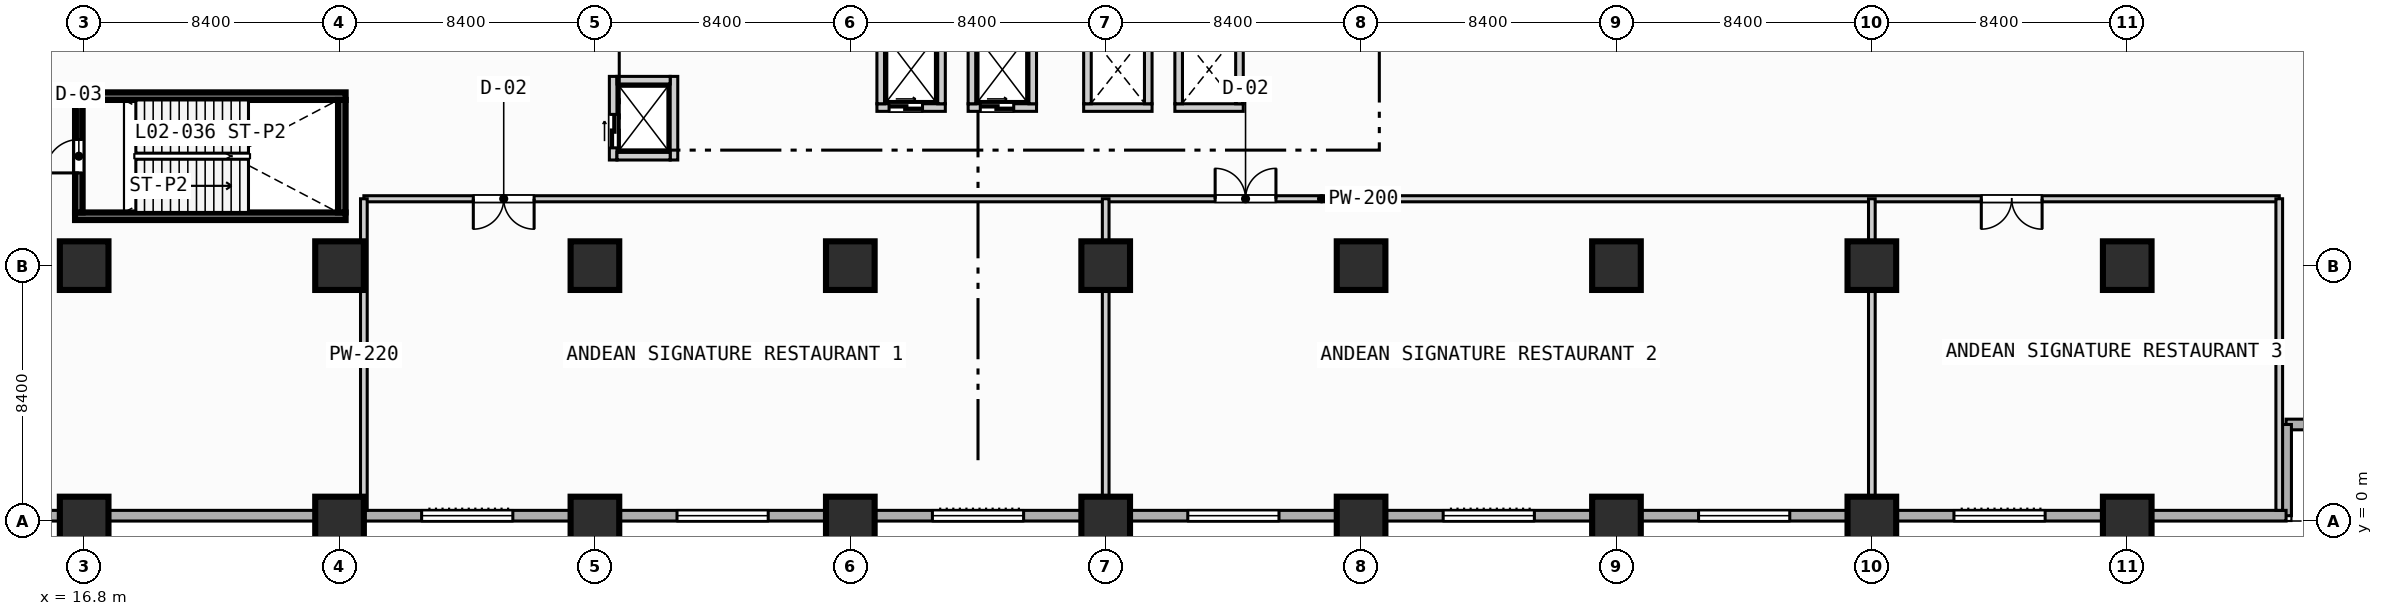
"""IFC4 building model, lengths in metres.
Left out: names, types, materials, properties, quantities, classifications, styles, units other than length and angle.
Written with IfcOpenShell. Run it as: python <this file> out.ifc"""

import sys

from ifc_helpers import new_model, si_unit, direction, frame, frame_2d, origin, origin_2d, place, context, subcontext, project, spatial, rectangle, extrude, element, fill, save


model = new_model("IFC4")
c1 = context("Model", 3, precision=1e-05, world=origin(), true_north=direction((0.0, 1.0)))
c2 = subcontext(c1, "Body", "Model", "MODEL_VIEW")
j1 = project(units=[si_unit("LENGTHUNIT", "METRE"), si_unit("PLANEANGLEUNIT", "RADIAN")], contexts=[c1])
p1 = place(None, origin())
s1 = spatial("IfcSite", under=j1, at=p1, CompositionType="ELEMENT")
p2 = place(p1, origin())
s2 = spatial("IfcBuilding", under=s1, at=p2, CompositionType="ELEMENT")
p3 = place(p2, frame((0.0, 0.0, 10.8)))
s3 = spatial("IfcBuildingStorey", under=s2, at=p3, CompositionType="ELEMENT", Elevation=10.8)
for number, where, z_axis, x_axis in (
    (1, (16.5, 10.025, 0.0), (0.0, 0.0, 1.0), (1.0, 0.0, 0.0)),
    (2, (16.5, 13.975, 0.0), (0.0, 0.0, 1.0), (1.0, 0.0, 0.0)),
):
    element("IfcWall", number, at=place(p3, frame(where, z_axis=z_axis, x_axis=x_axis)), inside=s3, PredefinedType="SOLIDWALL", context=c2, shape_type="SweptSolid", body=[
        extrude(rectangle(XDim=8.9, YDim=0.25, at=frame_2d((4.45, 0.0))), origin(), (0.0, 0.0, 1.0), 4.45),
    ])
p4 = place(p3, frame((25.275, 10.15, 0.0), z_axis=(0.0, 0.0, 1.0), x_axis=(0.0, 1.0, 0.0)))
e3 = element("IfcWall", 3, at=p4, inside=s3, PredefinedType="SOLIDWALL", context=c2, shape_type="SweptSolid", body=[
    extrude(rectangle(XDim=3.7, YDim=0.25, at=frame_2d((1.85, 0.0))), origin(), (0.0, 0.0, 1.0), 4.45),
])
for number, where, z_axis, x_axis in (
    (4, (16.8, 0.0, 0.0), (0.0, 0.0, 1.0), (1.0, 0.0, 0.0)),
    (5, (16.8, 8.4, 0.0), (0.0, 0.0, 1.0), (1.0, 0.0, 0.0)),
    (6, (25.2, 0.0, 0.0), (0.0, 0.0, 1.0), (1.0, 0.0, 0.0)),
    (7, (25.2, 8.4, 0.0), (0.0, 0.0, 1.0), (1.0, 0.0, 0.0)),
    (8, (33.6, 0.0, 0.0), (0.0, 0.0, 1.0), (1.0, 0.0, 0.0)),
    (9, (33.6, 8.4, 0.0), (0.0, 0.0, 1.0), (1.0, 0.0, 0.0)),
    (10, (42.0, 0.0, 0.0), (0.0, 0.0, 1.0), (1.0, 0.0, 0.0)),
    (11, (42.0, 8.4, 0.0), (0.0, 0.0, 1.0), (1.0, 0.0, 0.0)),
    (12, (50.4, 0.0, 0.0), (0.0, 0.0, 1.0), (1.0, 0.0, 0.0)),
    (13, (50.4, 8.4, 0.0), (0.0, 0.0, 1.0), (1.0, 0.0, 0.0)),
    (14, (58.8, 0.0, 0.0), (0.0, 0.0, 1.0), (1.0, 0.0, 0.0)),
    (15, (58.8, 8.4, 0.0), (0.0, 0.0, 1.0), (1.0, 0.0, 0.0)),
    (16, (67.2, 0.0, 0.0), (0.0, 0.0, 1.0), (1.0, 0.0, 0.0)),
    (17, (67.2, 8.4, 0.0), (0.0, 0.0, 1.0), (1.0, 0.0, 0.0)),
    (18, (75.6, 0.0, 0.0), (0.0, 0.0, 1.0), (1.0, 0.0, 0.0)),
    (19, (75.6, 8.4, 0.0), (0.0, 0.0, 1.0), (1.0, 0.0, 0.0)),
    (20, (84.0, 0.0, 0.0), (0.0, 0.0, 1.0), (1.0, 0.0, 0.0)),
    (21, (84.0, 8.4, 0.0), (0.0, 0.0, 1.0), (1.0, 0.0, 0.0)),
):
    element("IfcColumn", number, at=place(p3, frame(where, z_axis=z_axis, x_axis=x_axis)), inside=s3, PredefinedType="COLUMN", context=c2, shape_type="SweptSolid", body=[
        extrude(rectangle(XDim=1.6, YDim=1.6, at=origin_2d()), origin(), (0.0, 0.0, 1.0), 4.8),
    ])
for number, where, z_axis, x_axis in (
    (22, (92.225, 3.175, 0.0), (0.0, 0.0, 1.0), (-1.0, 0.0, 0.0)),
    (23, (89.225, 3.175, 0.0), (0.0, 0.0, 1.0), (0.0, -1.0, 0.0)),
):
    element("IfcWall", number, at=place(p3, frame(where, z_axis=z_axis, x_axis=x_axis)), inside=s3, PredefinedType="STANDARD", context=c2, shape_type="SweptSolid", body=[
        extrude(rectangle(XDim=3.0, YDim=0.35, at=frame_2d((1.5, 0.0))), origin(), (0.0, 0.0, 1.0), 4.45),
    ])
p5 = place(p3, frame((89.225, 0.175, 0.0), z_axis=(0.0, 0.0, 1.0), x_axis=(-1.0, 0.0, 0.0)))
e24 = element("IfcWall", 24, at=p5, inside=s3, PredefinedType="STANDARD", context=c2, shape_type="SweptSolid", body=[
    extrude(rectangle(XDim=86.05, YDim=0.35, at=frame_2d((43.025, 0.0))), origin(), (0.0, 0.0, 1.0), 4.45),
])
p6 = place(p5, frame((58.325, 0.0, 0.85)))
e25 = element("IfcOpeningElement", 25, at=p6, cuts=e24, PredefinedType="OPENING", context=c2, shape_type="SweptSolid", body=[
    extrude(rectangle(XDim=3.0, YDim=2.4, at=frame_2d((1.5, 1.2))), frame((0.0, 0.185, 0.0), z_axis=(0.0, -1.0, 0.0), x_axis=(1.0, 0.0, 0.0)), (0.0, 0.0, 1.0), 0.37),
])
p7 = place(p5, frame((49.925, 0.0, 0.85)))
e26 = element("IfcOpeningElement", 26, at=p7, cuts=e24, PredefinedType="OPENING", context=c2, shape_type="SweptSolid", body=[
    extrude(rectangle(XDim=3.0, YDim=2.4, at=frame_2d((1.5, 1.2))), frame((0.0, 0.185, 0.0), z_axis=(0.0, -1.0, 0.0), x_axis=(1.0, 0.0, 0.0)), (0.0, 0.0, 1.0), 0.37),
])
p8 = place(p5, frame((41.525, 0.0, 0.85)))
e27 = element("IfcOpeningElement", 27, at=p8, cuts=e24, PredefinedType="OPENING", context=c2, shape_type="SweptSolid", body=[
    extrude(rectangle(XDim=3.0, YDim=2.4, at=frame_2d((1.5, 1.2))), frame((0.0, 0.185, 0.0), z_axis=(0.0, -1.0, 0.0), x_axis=(1.0, 0.0, 0.0)), (0.0, 0.0, 1.0), 0.37),
])
p9 = place(p5, frame((33.125, 0.0, 0.85)))
e28 = element("IfcOpeningElement", 28, at=p9, cuts=e24, PredefinedType="OPENING", context=c2, shape_type="SweptSolid", body=[
    extrude(rectangle(XDim=3.0, YDim=2.4, at=frame_2d((1.5, 1.2))), frame((0.0, 0.185, 0.0), z_axis=(0.0, -1.0, 0.0), x_axis=(1.0, 0.0, 0.0)), (0.0, 0.0, 1.0), 0.37),
])
p10 = place(p5, frame((24.725, 0.0, 0.85)))
e29 = element("IfcOpeningElement", 29, at=p10, cuts=e24, PredefinedType="OPENING", context=c2, shape_type="SweptSolid", body=[
    extrude(rectangle(XDim=3.0, YDim=2.4, at=frame_2d((1.5, 1.2))), frame((0.0, 0.185, 0.0), z_axis=(0.0, -1.0, 0.0), x_axis=(1.0, 0.0, 0.0)), (0.0, 0.0, 1.0), 0.37),
])
p11 = place(p5, frame((16.325, 0.0, 0.85)))
e30 = element("IfcOpeningElement", 30, at=p11, cuts=e24, PredefinedType="OPENING", context=c2, shape_type="SweptSolid", body=[
    extrude(rectangle(XDim=3.0, YDim=2.4, at=frame_2d((1.5, 1.2))), frame((0.0, 0.185, 0.0), z_axis=(0.0, -1.0, 0.0), x_axis=(1.0, 0.0, 0.0)), (0.0, 0.0, 1.0), 0.37),
])
p12 = place(p5, frame((7.925, 0.0, 0.85)))
e31 = element("IfcOpeningElement", 31, at=p12, cuts=e24, PredefinedType="OPENING", context=c2, shape_type="SweptSolid", body=[
    extrude(rectangle(XDim=3.0, YDim=2.4, at=frame_2d((1.5, 1.2))), frame((0.0, 0.185, 0.0), z_axis=(0.0, -1.0, 0.0), x_axis=(1.0, 0.0, 0.0)), (0.0, 0.0, 1.0), 0.37),
])
p13 = place(p3, frame((34.2, 11.875, 0.0), z_axis=(0.0, 0.0, 1.0), x_axis=(0.0, 1.0, 0.0)))
e32 = element("IfcWall", 32, at=p13, inside=s3, PredefinedType="SOLIDWALL", context=c2, shape_type="SweptSolid", body=[
    extrude(rectangle(XDim=2.75, YDim=0.25, at=frame_2d((1.375, 0.0))), origin(), (0.0, 0.0, 1.0), 4.45),
])
p14 = place(p13, frame((0.4, 0.0, 0.0)))
e33 = element("IfcOpeningElement", 33, at=p14, cuts=e32, PredefinedType="OPENING", context=c2, shape_type="SweptSolid", body=[
    extrude(rectangle(XDim=1.1, YDim=2.15, at=frame_2d((0.55, 1.075))), frame((0.0, 0.135, 0.0), z_axis=(0.0, -1.0, 0.0), x_axis=(1.0, 0.0, 0.0)), (0.0, 0.0, 1.0), 0.27),
])
p15 = place(p3, frame((36.2, 11.875, 0.0), z_axis=(0.0, 0.0, 1.0), x_axis=(0.0, 1.0, 0.0)))
e34 = element("IfcWall", 34, at=p15, inside=s3, PredefinedType="SOLIDWALL", context=c2, shape_type="SweptSolid", body=[
    extrude(rectangle(XDim=2.75, YDim=0.25, at=frame_2d((1.375, 0.0))), origin(), (0.0, 0.0, 1.0), 4.45),
])
for number, where, z_axis, x_axis in (
    (35, (34.325, 12.0, 0.0), (0.0, 0.0, 1.0), (1.0, 0.0, 0.0)),
    (36, (34.325, 14.5, 0.0), (0.0, 0.0, 1.0), (1.0, 0.0, 0.0)),
):
    element("IfcWall", number, at=place(p3, frame(where, z_axis=z_axis, x_axis=x_axis)), inside=s3, PredefinedType="SOLIDWALL", context=c2, shape_type="SweptSolid", body=[
        extrude(rectangle(XDim=1.75, YDim=0.25, at=frame_2d((0.875, 0.0))), origin(), (0.0, 0.0, 1.0), 4.45),
    ])
p16 = place(p3, frame((42.875, 13.6, 0.0), z_axis=(0.0, 0.0, 1.0), x_axis=(1.0, 0.0, 0.0)))
e37 = element("IfcWall", 37, at=p16, inside=s3, PredefinedType="SOLIDWALL", context=c2, shape_type="SweptSolid", body=[
    extrude(rectangle(XDim=2.25, YDim=0.25, at=frame_2d((1.125, 0.0))), origin(), (0.0, 0.0, 1.0), 4.45),
])
p17 = place(p16, frame((0.4, 0.0, 0.0)))
e38 = element("IfcOpeningElement", 38, at=p17, cuts=e37, PredefinedType="OPENING", context=c2, shape_type="SweptSolid", body=[
    extrude(rectangle(XDim=1.1, YDim=2.15, at=frame_2d((0.55, 1.075))), frame((0.0, 0.135, 0.0), z_axis=(0.0, -1.0, 0.0), x_axis=(1.0, 0.0, 0.0)), (0.0, 0.0, 1.0), 0.27),
])
for number, where, z_axis, x_axis in (
    (39, (43.0, 13.725, 0.0), (0.0, 0.0, 1.0), (0.0, 1.0, 0.0)),
    (40, (45.0, 13.725, 0.0), (0.0, 0.0, 1.0), (0.0, 1.0, 0.0)),
):
    element("IfcWall", number, at=place(p3, frame(where, z_axis=z_axis, x_axis=x_axis)), inside=s3, PredefinedType="SOLIDWALL", context=c2, shape_type="SweptSolid", body=[
        extrude(rectangle(XDim=2.25, YDim=0.25, at=frame_2d((1.125, 0.0))), origin(), (0.0, 0.0, 1.0), 4.45),
    ])
p18 = place(p3, frame((45.875, 13.6, 0.0), z_axis=(0.0, 0.0, 1.0), x_axis=(1.0, 0.0, 0.0)))
e41 = element("IfcWall", 41, at=p18, inside=s3, PredefinedType="SOLIDWALL", context=c2, shape_type="SweptSolid", body=[
    extrude(rectangle(XDim=2.25, YDim=0.25, at=frame_2d((1.125, 0.0))), origin(), (0.0, 0.0, 1.0), 4.45),
])
p19 = place(p18, frame((0.4, 0.0, 0.0)))
e42 = element("IfcOpeningElement", 42, at=p19, cuts=e41, PredefinedType="OPENING", context=c2, shape_type="SweptSolid", body=[
    extrude(rectangle(XDim=1.1, YDim=2.15, at=frame_2d((0.55, 1.075))), frame((0.0, 0.135, 0.0), z_axis=(0.0, -1.0, 0.0), x_axis=(1.0, 0.0, 0.0)), (0.0, 0.0, 1.0), 0.27),
])
for number, where, z_axis, x_axis in (
    (43, (46.0, 13.725, 0.0), (0.0, 0.0, 1.0), (0.0, 1.0, 0.0)),
    (44, (48.0, 13.725, 0.0), (0.0, 0.0, 1.0), (0.0, 1.0, 0.0)),
    (45, (49.675, 13.6, 0.0), (0.0, 0.0, 1.0), (1.0, 0.0, 0.0)),
    (46, (49.8, 13.725, 0.0), (0.0, 0.0, 1.0), (0.0, 1.0, 0.0)),
    (47, (51.8, 13.725, 0.0), (0.0, 0.0, 1.0), (0.0, 1.0, 0.0)),
    (48, (52.675, 13.6, 0.0), (0.0, 0.0, 1.0), (1.0, 0.0, 0.0)),
    (49, (52.8, 13.725, 0.0), (0.0, 0.0, 1.0), (0.0, 1.0, 0.0)),
    (50, (54.8, 13.725, 0.0), (0.0, 0.0, 1.0), (0.0, 1.0, 0.0)),
):
    element("IfcWall", number, at=place(p3, frame(where, z_axis=z_axis, x_axis=x_axis)), inside=s3, PredefinedType="SOLIDWALL", context=c2, shape_type="SweptSolid", body=[
        extrude(rectangle(XDim=2.25, YDim=0.25, at=frame_2d((1.125, 0.0))), origin(), (0.0, 0.0, 1.0), 4.45),
    ])
p20 = place(p3, frame((16.625, 10.15, 0.0), z_axis=(0.0, 0.0, 1.0), x_axis=(0.0, 1.0, 0.0)))
e51 = element("IfcWall", 51, at=p20, inside=s3, PredefinedType="SOLIDWALL", context=c2, shape_type="SweptSolid", body=[
    extrude(rectangle(XDim=3.7, YDim=0.25, at=frame_2d((1.85, 0.0))), origin(), (0.0, 0.0, 1.0), 4.45),
])
p21 = place(p20, frame((1.3, 0.0, 0.0)))
e52 = element("IfcOpeningElement", 52, at=p21, cuts=e51, PredefinedType="OPENING", context=c2, shape_type="SweptSolid", body=[
    extrude(rectangle(XDim=1.1, YDim=2.15, at=frame_2d((0.55, 1.075))), frame((0.0, 0.135, 0.0), z_axis=(0.0, -1.0, 0.0), x_axis=(1.0, 0.0, 0.0)), (0.0, 0.0, 1.0), 0.27),
])
p22 = place(p3, frame((26.0, 10.6, 0.0), z_axis=(0.0, 0.0, 1.0), x_axis=(1.0, 0.0, 0.0)))
e53 = element("IfcWall", 53, at=p22, inside=s3, PredefinedType="PARTITIONING", context=c2, shape_type="SweptSolid", body=[
    extrude(rectangle(XDim=63.0, YDim=0.2, at=frame_2d((31.5, 0.0))), origin(), (0.0, 0.0, 1.0), 4.45),
])
p23 = place(p22, frame((3.6, 0.0, 0.0)))
e54 = element("IfcOpeningElement", 54, at=p23, cuts=e53, PredefinedType="OPENING", context=c2, shape_type="SweptSolid", body=[
    extrude(rectangle(XDim=2.0, YDim=2.15, at=frame_2d((1.0, 1.075))), frame((0.0, 0.11, 0.0), z_axis=(0.0, -1.0, 0.0), x_axis=(1.0, 0.0, 0.0)), (0.0, 0.0, 1.0), 0.22),
])
p24 = place(p22, frame((28.0, 0.0, 0.0)))
e55 = element("IfcOpeningElement", 55, at=p24, cuts=e53, PredefinedType="OPENING", context=c2, shape_type="SweptSolid", body=[
    extrude(rectangle(XDim=2.0, YDim=2.15, at=frame_2d((1.0, 1.075))), frame((0.0, 0.11, 0.0), z_axis=(0.0, -1.0, 0.0), x_axis=(1.0, 0.0, 0.0)), (0.0, 0.0, 1.0), 0.22),
])
p25 = place(p22, frame((53.2, 0.0, 0.0)))
e56 = element("IfcOpeningElement", 56, at=p25, cuts=e53, PredefinedType="OPENING", context=c2, shape_type="SweptSolid", body=[
    extrude(rectangle(XDim=2.0, YDim=2.15, at=frame_2d((1.0, 1.075))), frame((0.0, 0.11, 0.0), z_axis=(0.0, -1.0, 0.0), x_axis=(1.0, 0.0, 0.0)), (0.0, 0.0, 1.0), 0.22),
])
p26 = place(p3, frame((26.0, 0.35, 0.0), z_axis=(0.0, 0.0, 1.0), x_axis=(0.0, 1.0, 0.0)))
e57 = element("IfcWall", 57, at=p26, inside=s3, PredefinedType="PARTITIONING", context=c2, shape_type="SweptSolid", body=[
    extrude(rectangle(XDim=10.25, YDim=0.22, at=frame_2d((5.125, 0.0))), origin(), (0.0, 0.0, 1.0), 4.45),
])
p27 = place(p3, frame((50.4, 0.35, 0.0), z_axis=(0.0, 0.0, 1.0), x_axis=(0.0, 1.0, 0.0)))
e58 = element("IfcWall", 58, at=p27, inside=s3, PredefinedType="PARTITIONING", context=c2, shape_type="SweptSolid", body=[
    extrude(rectangle(XDim=10.25, YDim=0.22, at=frame_2d((5.125, 0.0))), origin(), (0.0, 0.0, 1.0), 3.839),
])
p28 = place(p3, frame((75.6, 0.35, 0.0), z_axis=(0.0, 0.0, 1.0), x_axis=(0.0, 1.0, 0.0)))
e59 = element("IfcWall", 59, at=p28, inside=s3, PredefinedType="PARTITIONING", context=c2, shape_type="SweptSolid", body=[
    extrude(rectangle(XDim=10.25, YDim=0.22, at=frame_2d((5.125, 0.0))), origin(), (0.0, 0.0, 1.0), 3.6),
])
p29 = place(p3, frame((89.0, 0.35, 0.0), z_axis=(0.0, 0.0, 1.0), x_axis=(0.0, 1.0, 0.0)))
e60 = element("IfcWall", 60, at=p29, inside=s3, PredefinedType="PARTITIONING", context=c2, shape_type="SweptSolid", body=[
    extrude(rectangle(XDim=10.25, YDim=0.22, at=frame_2d((5.125, 0.0))), origin(), (0.0, 0.0, 1.0), 4.45),
])
p30 = place(p6, origin())
e61 = element("IfcWindow", 61, at=p30, inside=s3, PartitioningType="SINGLE_PANEL", PredefinedType="WINDOW", context=c2, shape_type="SweptSolid", body=[
    extrude(rectangle(XDim=3.0, YDim=2.4, at=frame_2d((1.5, 1.2))), frame((0.0, 0.03, 0.0), z_axis=(0.0, -1.0, 0.0), x_axis=(1.0, 0.0, 0.0)), (0.0, 0.0, 1.0), 0.06),
])
fill(e25, e61)
p31 = place(p7, origin())
e62 = element("IfcWindow", 62, at=p31, inside=s3, PartitioningType="SINGLE_PANEL", PredefinedType="WINDOW", context=c2, shape_type="SweptSolid", body=[
    extrude(rectangle(XDim=3.0, YDim=2.4, at=frame_2d((1.5, 1.2))), frame((0.0, 0.03, 0.0), z_axis=(0.0, -1.0, 0.0), x_axis=(1.0, 0.0, 0.0)), (0.0, 0.0, 1.0), 0.06),
])
fill(e26, e62)
p32 = place(p8, origin())
e63 = element("IfcWindow", 63, at=p32, inside=s3, PartitioningType="SINGLE_PANEL", PredefinedType="WINDOW", context=c2, shape_type="SweptSolid", body=[
    extrude(rectangle(XDim=3.0, YDim=2.4, at=frame_2d((1.5, 1.2))), frame((0.0, 0.03, 0.0), z_axis=(0.0, -1.0, 0.0), x_axis=(1.0, 0.0, 0.0)), (0.0, 0.0, 1.0), 0.06),
])
fill(e27, e63)
p33 = place(p9, origin())
e64 = element("IfcWindow", 64, at=p33, inside=s3, PartitioningType="SINGLE_PANEL", PredefinedType="WINDOW", context=c2, shape_type="SweptSolid", body=[
    extrude(rectangle(XDim=3.0, YDim=2.4, at=frame_2d((1.5, 1.2))), frame((0.0, 0.03, 0.0), z_axis=(0.0, -1.0, 0.0), x_axis=(1.0, 0.0, 0.0)), (0.0, 0.0, 1.0), 0.06),
])
fill(e28, e64)
p34 = place(p10, origin())
e65 = element("IfcWindow", 65, at=p34, inside=s3, PartitioningType="SINGLE_PANEL", PredefinedType="WINDOW", context=c2, shape_type="SweptSolid", body=[
    extrude(rectangle(XDim=3.0, YDim=2.4, at=frame_2d((1.5, 1.2))), frame((0.0, 0.03, 0.0), z_axis=(0.0, -1.0, 0.0), x_axis=(1.0, 0.0, 0.0)), (0.0, 0.0, 1.0), 0.06),
])
fill(e29, e65)
p35 = place(p11, origin())
e66 = element("IfcWindow", 66, at=p35, inside=s3, PartitioningType="SINGLE_PANEL", PredefinedType="WINDOW", context=c2, shape_type="SweptSolid", body=[
    extrude(rectangle(XDim=3.0, YDim=2.4, at=frame_2d((1.5, 1.2))), frame((0.0, 0.03, 0.0), z_axis=(0.0, -1.0, 0.0), x_axis=(1.0, 0.0, 0.0)), (0.0, 0.0, 1.0), 0.06),
])
fill(e30, e66)
p36 = place(p12, origin())
e67 = element("IfcWindow", 67, at=p36, inside=s3, PartitioningType="SINGLE_PANEL", PredefinedType="WINDOW", context=c2, shape_type="SweptSolid", body=[
    extrude(rectangle(XDim=3.0, YDim=2.4, at=frame_2d((1.5, 1.2))), frame((0.0, 0.03, 0.0), z_axis=(0.0, -1.0, 0.0), x_axis=(1.0, 0.0, 0.0)), (0.0, 0.0, 1.0), 0.06),
])
fill(e31, e67)
p37 = place(p14, origin())
e68 = element("IfcDoor", 68, at=p37, inside=s3, OperationType="SLIDING_TO_LEFT", PredefinedType="DOOR", context=c2, shape_type="SweptSolid", body=[
    extrude(rectangle(XDim=1.1, YDim=2.15, at=frame_2d((0.55, 1.075))), frame((0.0, 0.025, 0.0), z_axis=(0.0, -1.0, 0.0), x_axis=(1.0, 0.0, 0.0)), (0.0, 0.0, 1.0), 0.05),
])
fill(e33, e68)
p38 = place(p17, origin())
e69 = element("IfcDoor", 69, at=p38, inside=s3, OperationType="SLIDING_TO_LEFT", PredefinedType="DOOR", context=c2, shape_type="SweptSolid", body=[
    extrude(rectangle(XDim=1.1, YDim=2.15, at=frame_2d((0.55, 1.075))), frame((0.0, 0.025, 0.0), z_axis=(0.0, -1.0, 0.0), x_axis=(1.0, 0.0, 0.0)), (0.0, 0.0, 1.0), 0.05),
])
fill(e38, e69)
p39 = place(p19, origin())
e70 = element("IfcDoor", 70, at=p39, inside=s3, OperationType="SLIDING_TO_LEFT", PredefinedType="DOOR", context=c2, shape_type="SweptSolid", body=[
    extrude(rectangle(XDim=1.1, YDim=2.15, at=frame_2d((0.55, 1.075))), frame((0.0, 0.025, 0.0), z_axis=(0.0, -1.0, 0.0), x_axis=(1.0, 0.0, 0.0)), (0.0, 0.0, 1.0), 0.05),
])
fill(e42, e70)
p40 = place(p21, origin())
e71 = element("IfcDoor", 71, at=p40, inside=s3, OperationType="SINGLE_SWING_LEFT", PredefinedType="DOOR", context=c2, shape_type="SweptSolid", body=[
    extrude(rectangle(XDim=1.1, YDim=2.15, at=frame_2d((0.55, 1.075))), frame((0.0, 0.025, 0.0), z_axis=(0.0, -1.0, 0.0), x_axis=(1.0, 0.0, 0.0)), (0.0, 0.0, 1.0), 0.05),
])
fill(e52, e71)
p41 = place(p23, origin())
e72 = element("IfcDoor", 72, at=p41, inside=s3, OperationType="SINGLE_SWING_RIGHT", PredefinedType="DOOR", context=c2, shape_type="SweptSolid", body=[
    extrude(rectangle(XDim=2.0, YDim=2.15, at=frame_2d((1.0, 1.075))), frame((0.0, 0.025, 0.0), z_axis=(0.0, -1.0, 0.0), x_axis=(1.0, 0.0, 0.0)), (0.0, 0.0, 1.0), 0.05),
])
fill(e54, e72)
p42 = place(p24, origin())
e73 = element("IfcDoor", 73, at=p42, inside=s3, OperationType="SINGLE_SWING_LEFT", PredefinedType="DOOR", context=c2, shape_type="SweptSolid", body=[
    extrude(rectangle(XDim=2.0, YDim=2.15, at=frame_2d((1.0, 1.075))), frame((0.0, 0.025, 0.0), z_axis=(0.0, -1.0, 0.0), x_axis=(1.0, 0.0, 0.0)), (0.0, 0.0, 1.0), 0.05),
])
fill(e55, e73)
p43 = place(p25, origin())
e74 = element("IfcDoor", 74, at=p43, inside=s3, OperationType="SINGLE_SWING_RIGHT", PredefinedType="DOOR", context=c2, shape_type="SweptSolid", body=[
    extrude(rectangle(XDim=2.0, YDim=2.15, at=frame_2d((1.0, 1.075))), frame((0.0, 0.025, 0.0), z_axis=(0.0, -1.0, 0.0), x_axis=(1.0, 0.0, 0.0)), (0.0, 0.0, 1.0), 0.05),
])
fill(e56, e74)
save(model, sys.argv[1])
